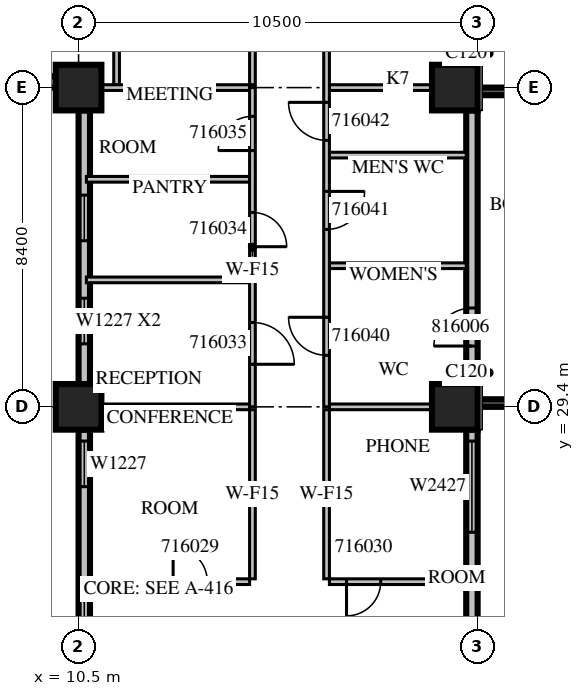
"""IFC4 building model, lengths in metres.
Left out: names, types, materials, properties, quantities, classifications, styles, units other than length and angle.
Written with IfcOpenShell. Run it as: python <this file> out.ifc"""

import sys

from ifc_helpers import new_model, si_unit, direction, frame, frame_2d, origin, origin_2d, place, context, subcontext, project, spatial, rectangle, extrude, source, transform, mapped, element, fill, save


model = new_model("IFC4")
c1 = context("Model", 3, precision=1e-05, world=origin(), true_north=direction((0.0, 1.0)))
c2 = subcontext(c1, "Body", "Model", "MODEL_VIEW")
j1 = project(units=[si_unit("LENGTHUNIT", "METRE"), si_unit("PLANEANGLEUNIT", "RADIAN")], contexts=[c1])
p1 = place(None, origin())
s1 = spatial("IfcSite", under=j1, at=p1, CompositionType="ELEMENT")
p2 = place(p1, origin())
s2 = spatial("IfcBuilding", under=s1, at=p2, CompositionType="ELEMENT")
p3 = place(p2, frame((0.0, 0.0, 78.3)))
s3 = spatial("IfcBuildingStorey", under=s2, at=p3, CompositionType="ELEMENT", Elevation=78.3)
m1 = source(origin(), c2, "Body", "SweptSolid", [
    extrude(rectangle(XDim=1.2, YDim=1.2, at=origin_2d()), origin(), (0.0, 0.0, 1.0), 4.2),
])
for number, where, z_axis, x_axis in (
    (1, (10.5, 29.4, 0.0), (0.0, 0.0, 1.0), (1.0, 0.0, 0.0)),
    (2, (20.4, 29.4, 0.0), (0.0, 0.0, 1.0), (1.0, 0.0, 0.0)),
    (3, (10.5, 37.8, 0.0), (0.0, 0.0, 1.0), (1.0, 0.0, 0.0)),
    (4, (20.4, 37.8, 0.0), (0.0, 0.0, 1.0), (1.0, 0.0, 0.0)),
):
    element("IfcColumn", number, at=place(p3, frame(where, z_axis=z_axis, x_axis=x_axis)), inside=s3, PredefinedType="COLUMN", context=c2, shape_type="MappedRepresentation", body=[
        mapped(m1, transform((0.0, 0.0, 0.0), scale=1.0)),
    ])
m2 = source(origin(), c2, "Body", "SweptSolid", [
    extrude(rectangle(XDim=6.6, YDim=0.3, at=frame_2d((3.3, 0.0))), origin(), (0.0, 0.0, 1.0), 3.8),
])
p4 = place(p3, frame((20.85, 22.2, 0.0), z_axis=(0.0, 0.0, 1.0), x_axis=(0.0, 1.0, 0.0)))
e5 = element("IfcWall", 5, at=p4, inside=s3, PredefinedType="STANDARD", context=c2, shape_type="MappedRepresentation", body=[
    mapped(m2, transform((0.0, 0.0, 0.0), scale=1.0)),
])
m3 = source(origin(), c2, "Body", "SweptSolid", [
    extrude(rectangle(XDim=1.2, YDim=2.7, at=frame_2d((0.6, 1.35))), frame((0.0, 0.16, 0.0), z_axis=(0.0, -1.0, 0.0), x_axis=(1.0, 0.0, 0.0)), (0.0, 0.0, 1.0), 0.32),
])
p5 = place(p4, frame((0.3, 0.0, 0.6)))
e6 = element("IfcOpeningElement", 6, at=p5, cuts=e5, PredefinedType="OPENING", context=c2, shape_type="MappedRepresentation", body=[
    mapped(m3, transform((0.0, 0.0, 0.0), scale=1.0)),
])
m4 = source(origin(), c2, "Body", "SweptSolid", [
    extrude(rectangle(XDim=2.4, YDim=2.7, at=frame_2d((1.2, 1.35))), frame((0.0, 0.16, 0.0), z_axis=(0.0, -1.0, 0.0), x_axis=(1.0, 0.0, 0.0)), (0.0, 0.0, 1.0), 0.32),
])
p6 = place(p4, frame((3.9, 0.0, 0.6)))
e7 = element("IfcOpeningElement", 7, at=p6, cuts=e5, PredefinedType="OPENING", context=c2, shape_type="MappedRepresentation", body=[
    mapped(m4, transform((0.0, 0.0, 0.0), scale=1.0)),
])
m5 = source(origin(), c2, "Body", "SweptSolid", [
    extrude(rectangle(XDim=7.2, YDim=0.3, at=frame_2d((3.6, 0.0))), origin(), (0.0, 0.0, 1.0), 3.8),
])
p7 = place(p3, frame((20.85, 30.0, 0.0), z_axis=(0.0, 0.0, 1.0), x_axis=(0.0, 1.0, 0.0)))
e8 = element("IfcWall", 8, at=p7, inside=s3, PredefinedType="STANDARD", context=c2, shape_type="MappedRepresentation", body=[
    mapped(m5, transform((0.0, 0.0, 0.0), scale=1.0)),
])
m6 = source(origin(), c2, "Body", "SweptSolid", [
    extrude(rectangle(XDim=1.0, YDim=2.1, at=frame_2d((0.5, 1.05))), frame((0.0, 0.16, 0.0), z_axis=(0.0, -1.0, 0.0), x_axis=(1.0, 0.0, 0.0)), (0.0, 0.0, 1.0), 0.32),
])
p8 = place(p7, frame((1.0, 0.0, 0.0)))
e9 = element("IfcOpeningElement", 9, at=p8, cuts=e8, PredefinedType="OPENING", context=c2, shape_type="MappedRepresentation", body=[
    mapped(m6, transform((0.0, 0.0, 0.0), scale=1.0)),
])
p9 = place(p3, frame((20.85, 38.4, 0.0), z_axis=(0.0, 0.0, 1.0), x_axis=(0.0, 1.0, 0.0)))
e10 = element("IfcWall", 10, at=p9, inside=s3, PredefinedType="STANDARD", context=c2, shape_type="MappedRepresentation", body=[
    mapped(m5, transform((0.0, 0.0, 0.0), scale=1.0)),
])
p10 = place(p9, frame((0.3, 0.0, 0.6)))
e11 = element("IfcOpeningElement", 11, at=p10, cuts=e10, PredefinedType="OPENING", context=c2, shape_type="MappedRepresentation", body=[
    mapped(m4, transform((0.0, 0.0, 0.0), scale=1.0)),
])
p11 = place(p9, frame((4.5, 0.0, 0.6)))
e12 = element("IfcOpeningElement", 12, at=p11, cuts=e10, PredefinedType="OPENING", context=c2, shape_type="MappedRepresentation", body=[
    mapped(m4, transform((0.0, 0.0, 0.0), scale=1.0)),
])
m7 = source(origin(), c2, "Body", "SweptSolid", [
    extrude(rectangle(XDim=8.7, YDim=0.3, at=frame_2d((4.35, 0.0))), origin(), (0.0, 0.0, 1.0), 3.8),
])
p12 = place(p3, frame((1.2, 37.95, 0.0), z_axis=(0.0, 0.0, 1.0), x_axis=(1.0, 0.0, 0.0)))
e13 = element("IfcWall", 13, at=p12, inside=s3, PredefinedType="STANDARD", context=c2, shape_type="MappedRepresentation", body=[
    mapped(m7, transform((0.0, 0.0, 0.0), scale=1.0)),
])
p13 = place(p12, frame((0.225, 0.0, 0.6)))
e14 = element("IfcOpeningElement", 14, at=p13, cuts=e13, PredefinedType="OPENING", context=c2, shape_type="MappedRepresentation", body=[
    mapped(m4, transform((0.0, 0.0, 0.0), scale=1.0)),
])
m8 = source(origin(), c2, "Body", "SweptSolid", [
    extrude(rectangle(XDim=1.8, YDim=2.7, at=frame_2d((0.9, 1.35))), frame((0.0, 0.16, 0.0), z_axis=(0.0, -1.0, 0.0), x_axis=(1.0, 0.0, 0.0)), (0.0, 0.0, 1.0), 0.32),
])
p14 = place(p12, frame((5.088, 0.0, 0.6)))
e15 = element("IfcOpeningElement", 15, at=p14, cuts=e13, PredefinedType="OPENING", context=c2, shape_type="MappedRepresentation", body=[
    mapped(m8, transform((0.0, 0.0, 0.0), scale=1.0)),
])
p15 = place(p3, frame((10.65, 37.2, 0.0), z_axis=(0.0, 0.0, 1.0), x_axis=(0.0, -1.0, 0.0)))
e16 = element("IfcWall", 16, at=p15, inside=s3, PredefinedType="STANDARD", context=c2, shape_type="MappedRepresentation", body=[
    mapped(m5, transform((0.0, 0.0, 0.0), scale=1.0)),
])
p16 = place(p15, frame((4.942, 0.0, 0.6)))
e17 = element("IfcOpeningElement", 17, at=p16, cuts=e16, PredefinedType="OPENING", context=c2, shape_type="MappedRepresentation", body=[
    mapped(m3, transform((0.0, 0.0, 0.0), scale=1.0)),
])
p17 = place(p15, frame((2.229, 0.0, 0.6)))
e18 = element("IfcOpeningElement", 18, at=p17, cuts=e16, PredefinedType="OPENING", context=c2, shape_type="MappedRepresentation", body=[
    mapped(m3, transform((0.0, 0.0, 0.0), scale=1.0)),
])
p18 = place(p3, frame((10.65, 28.8, 0.0), z_axis=(0.0, 0.0, 1.0), x_axis=(0.0, -1.0, 0.0)))
e19 = element("IfcWall", 19, at=p18, inside=s3, PredefinedType="STANDARD", context=c2, shape_type="MappedRepresentation", body=[
    mapped(m2, transform((0.0, 0.0, 0.0), scale=1.0)),
])
p19 = place(p18, frame((0.3, 0.0, 0.6)))
e20 = element("IfcOpeningElement", 20, at=p19, cuts=e19, PredefinedType="OPENING", context=c2, shape_type="MappedRepresentation", body=[
    mapped(m3, transform((0.0, 0.0, 0.0), scale=1.0)),
])
p20 = place(p18, frame((4.338, 0.0, 0.6)))
e21 = element("IfcOpeningElement", 21, at=p20, cuts=e19, PredefinedType="OPENING", context=c2, shape_type="MappedRepresentation", body=[
    mapped(m8, transform((0.0, 0.0, 0.0), scale=1.0)),
])
m9 = source(origin(), c2, "Body", "SweptSolid", [
    extrude(rectangle(XDim=3.9, YDim=0.2, at=frame_2d((1.95, 0.0))), origin(), (0.0, 0.0, 1.0), 3.79),
])
p21 = place(p3, frame((21.0, 29.5, 0.0), z_axis=(0.0, 0.0, 1.0), x_axis=(1.0, 0.0, 0.0)))
e22 = element("IfcWall", 22, at=p21, inside=s3, PredefinedType="SOLIDWALL", context=c2, shape_type="MappedRepresentation", body=[
    mapped(m9, transform((0.0, 0.0, 0.0), scale=1.0)),
])
m10 = source(origin(), c2, "Body", "SweptSolid", [
    extrude(rectangle(XDim=2.4, YDim=2.7, at=frame_2d((1.2, 1.35))), frame((0.0, 0.11, 0.0), z_axis=(0.0, -1.0, 0.0), x_axis=(1.0, 0.0, 0.0)), (0.0, 0.0, 1.0), 0.22),
])
p22 = place(p21, frame((0.75, 0.0, 0.6)))
e23 = element("IfcOpeningElement", 23, at=p22, cuts=e22, PredefinedType="OPENING", context=c2, shape_type="MappedRepresentation", body=[
    mapped(m10, transform((0.0, 0.0, 0.0), scale=1.0)),
])
p23 = place(p3, frame((21.0, 37.7, 0.0), z_axis=(0.0, 0.0, 1.0), x_axis=(1.0, 0.0, 0.0)))
e24 = element("IfcWall", 24, at=p23, inside=s3, PredefinedType="SOLIDWALL", context=c2, shape_type="MappedRepresentation", body=[
    mapped(m9, transform((0.0, 0.0, 0.0), scale=1.0)),
])
p24 = place(p23, frame((0.75, 0.0, 0.6)))
e25 = element("IfcOpeningElement", 25, at=p24, cuts=e24, PredefinedType="OPENING", context=c2, shape_type="MappedRepresentation", body=[
    mapped(m10, transform((0.0, 0.0, 0.0), scale=1.0)),
])
m11 = source(origin(), c2, "Body", "SweptSolid", [
    extrude(rectangle(XDim=4.295, YDim=0.15, at=frame_2d((2.147, 0.0))), origin(), (0.0, 0.0, 1.0), 3.8),
])
p25 = place(p3, frame((10.705, 24.8, 0.0), z_axis=(0.0, 0.0, 1.0), x_axis=(1.0, 0.0, 0.0)))
e26 = element("IfcWall", 26, at=p25, inside=s3, PredefinedType="PARTITIONING", context=c2, shape_type="MappedRepresentation", body=[
    mapped(m11, transform((0.0, 0.0, 0.0), scale=1.0)),
])
m12 = source(origin(), c2, "Body", "SweptSolid", [
    extrude(rectangle(XDim=0.9, YDim=2.1, at=frame_2d((0.45, 1.05))), frame((0.0, 0.085, 0.0), z_axis=(0.0, -1.0, 0.0), x_axis=(1.0, 0.0, 0.0)), (0.0, 0.0, 1.0), 0.17),
])
p26 = place(p25, frame((2.283, 0.0, 0.0)))
e27 = element("IfcOpeningElement", 27, at=p26, cuts=e26, PredefinedType="OPENING", context=c2, shape_type="MappedRepresentation", body=[
    mapped(m12, transform((0.0, 0.0, 0.0), scale=1.0)),
])
m13 = source(origin(), c2, "Body", "SweptSolid", [
    extrude(rectangle(XDim=3.6, YDim=0.15, at=frame_2d((1.8, 0.0))), origin(), (0.0, 0.0, 1.0), 3.8),
])
p27 = place(p3, frame((17.1, 24.8, 0.0), z_axis=(0.0, 0.0, 1.0), x_axis=(1.0, 0.0, 0.0)))
e28 = element("IfcWall", 28, at=p27, inside=s3, PredefinedType="PARTITIONING", context=c2, shape_type="MappedRepresentation", body=[
    mapped(m13, transform((0.0, 0.0, 0.0), scale=1.0)),
])
p28 = place(p27, frame((0.45, 0.0, 0.0)))
e29 = element("IfcOpeningElement", 29, at=p28, cuts=e28, PredefinedType="OPENING", context=c2, shape_type="MappedRepresentation", body=[
    mapped(m12, transform((0.0, 0.0, 0.0), scale=1.0)),
])
m14 = source(origin(), c2, "Body", "SweptSolid", [
    extrude(rectangle(XDim=4.45, YDim=0.15, at=frame_2d((2.225, 0.0))), origin(), (0.0, 0.0, 1.0), 3.8),
])
for number, where, z_axis, x_axis in (
    (30, (15.075, 24.875, 0.0), (0.0, 0.0, 1.0), (0.0, 1.0, 0.0)),
    (31, (17.025, 29.325, 0.0), (0.0, 0.0, 1.0), (0.0, -1.0, 0.0)),
):
    element("IfcWall", number, at=place(p3, frame(where, z_axis=z_axis, x_axis=x_axis)), inside=s3, PredefinedType="PARTITIONING", context=c2, shape_type="MappedRepresentation", body=[
        mapped(m14, transform((0.0, 0.0, 0.0), scale=1.0)),
    ])
m15 = source(origin(), c2, "Body", "SweptSolid", [
    extrude(rectangle(XDim=3.901, YDim=0.15, at=frame_2d((1.95, 0.0))), origin(), (0.0, 0.0, 1.0), 3.8),
])
p29 = place(p3, frame((15.0, 29.4, 0.0), z_axis=(0.0, 0.0, 1.0), x_axis=(-1.0, 0.0, 0.0)))
e32 = element("IfcWall", 32, at=p29, inside=s3, PredefinedType="PARTITIONING", context=c2, shape_type="MappedRepresentation", body=[
    mapped(m15, transform((0.0, 0.0, 0.0), scale=1.0)),
])
m16 = source(origin(), c2, "Body", "SweptSolid", [
    extrude(rectangle(XDim=2.701, YDim=0.15, at=frame_2d((1.351, 0.0))), origin(), (0.0, 0.0, 1.0), 3.8),
])
p30 = place(p3, frame((19.801, 29.4, 0.0), z_axis=(0.0, 0.0, 1.0), x_axis=(-1.0, 0.0, 0.0)))
e33 = element("IfcWall", 33, at=p30, inside=s3, PredefinedType="PARTITIONING", context=c2, shape_type="MappedRepresentation", body=[
    mapped(m16, transform((0.0, 0.0, 0.0), scale=1.0)),
])
m17 = source(origin(), c2, "Body", "SweptSolid", [
    extrude(rectangle(XDim=6.45, YDim=0.15, at=frame_2d((3.225, 0.0))), origin(), (0.0, 0.0, 1.0), 3.8),
])
p31 = place(p3, frame((11.5, 44.325, 0.0), z_axis=(0.0, 0.0, 1.0), x_axis=(0.0, -1.0, 0.0)))
e34 = element("IfcWall", 34, at=p31, inside=s3, PredefinedType="PARTITIONING", context=c2, shape_type="MappedRepresentation", body=[
    mapped(m17, transform((0.0, 0.0, 0.0), scale=1.0)),
])
p32 = place(p3, frame((15.075, 37.875, 0.0), z_axis=(0.0, 0.0, 1.0), x_axis=(0.0, 1.0, 0.0)))
e35 = element("IfcWall", 35, at=p32, inside=s3, PredefinedType="PARTITIONING", context=c2, shape_type="MappedRepresentation", body=[
    mapped(m17, transform((0.0, 0.0, 0.0), scale=1.0)),
])
p33 = place(p32, frame((2.737, 0.0, 0.0)))
e36 = element("IfcOpeningElement", 36, at=p33, cuts=e35, PredefinedType="OPENING", context=c2, shape_type="MappedRepresentation", body=[
    mapped(m12, transform((0.0, 0.0, 0.0), scale=1.0)),
])
for number, where, z_axis, x_axis in (
    (37, (15.0, 32.74, 0.0), (0.0, 0.0, 1.0), (-1.0, 0.0, 0.0)),
    (38, (15.0, 35.388, 0.0), (0.0, 0.0, 1.0), (-1.0, 0.0, 0.0)),
):
    element("IfcWall", number, at=place(p3, frame(where, z_axis=z_axis, x_axis=x_axis)), inside=s3, PredefinedType="PARTITIONING", context=c2, shape_type="MappedRepresentation", body=[
        mapped(m11, transform((0.0, 0.0, 0.0), scale=1.0)),
    ])
p34 = place(p3, frame((15.0, 37.8, 0.0), z_axis=(0.0, 0.0, 1.0), x_axis=(-1.0, 0.0, 0.0)))
e39 = element("IfcWall", 39, at=p34, inside=s3, PredefinedType="PARTITIONING", context=c2, shape_type="MappedRepresentation", body=[
    mapped(m15, transform((0.0, 0.0, 0.0), scale=1.0)),
])
for number, where, z_axis, x_axis in (
    (40, (17.1, 33.113, 0.0), (0.0, 0.0, 1.0), (1.0, 0.0, 0.0)),
    (41, (17.1, 36.024, 0.0), (0.0, 0.0, 1.0), (1.0, 0.0, 0.0)),
):
    element("IfcWall", number, at=place(p3, frame(where, z_axis=z_axis, x_axis=x_axis)), inside=s3, PredefinedType="PARTITIONING", context=c2, shape_type="MappedRepresentation", body=[
        mapped(m13, transform((0.0, 0.0, 0.0), scale=1.0)),
    ])
p35 = place(p3, frame((19.801, 37.8, 0.0), z_axis=(0.0, 0.0, 1.0), x_axis=(-1.0, 0.0, 0.0)))
e42 = element("IfcWall", 42, at=p35, inside=s3, PredefinedType="PARTITIONING", context=c2, shape_type="MappedRepresentation", body=[
    mapped(m16, transform((0.0, 0.0, 0.0), scale=1.0)),
])
m18 = source(origin(), c2, "Body", "SweptSolid", [
    extrude(rectangle(XDim=8.4, YDim=0.15, at=frame_2d((4.2, 0.0))), origin(), (0.0, 0.0, 1.0), 3.8),
])
p36 = place(p3, frame((15.075, 29.4, 0.0), z_axis=(0.0, 0.0, 1.0), x_axis=(0.0, 1.0, 0.0)))
e43 = element("IfcWall", 43, at=p36, inside=s3, PredefinedType="PARTITIONING", context=c2, shape_type="MappedRepresentation", body=[
    mapped(m18, transform((0.0, 0.0, 0.0), scale=1.0)),
])
m19 = source(origin(), c2, "Body", "SweptSolid", [
    extrude(rectangle(XDim=1.1, YDim=2.1, at=frame_2d((0.55, 1.05))), frame((0.0, 0.085, 0.0), z_axis=(0.0, -1.0, 0.0), x_axis=(1.0, 0.0, 0.0)), (0.0, 0.0, 1.0), 0.17),
])
p37 = place(p36, frame((1.12, 0.0, 0.0)))
e44 = element("IfcOpeningElement", 44, at=p37, cuts=e43, PredefinedType="OPENING", context=c2, shape_type="MappedRepresentation", body=[
    mapped(m19, transform((0.0, 0.0, 0.0), scale=1.0)),
])
p38 = place(p36, frame((4.214, 0.0, 0.0)))
e45 = element("IfcOpeningElement", 45, at=p38, cuts=e43, PredefinedType="OPENING", context=c2, shape_type="MappedRepresentation", body=[
    mapped(m12, transform((0.0, 0.0, 0.0), scale=1.0)),
])
p39 = place(p36, frame((6.744, 0.0, 0.0)))
e46 = element("IfcOpeningElement", 46, at=p39, cuts=e43, PredefinedType="OPENING", context=c2, shape_type="MappedRepresentation", body=[
    mapped(m12, transform((0.0, 0.0, 0.0), scale=1.0)),
])
p40 = place(p3, frame((17.025, 56.82, 0.0), z_axis=(0.0, 0.0, 1.0), x_axis=(0.0, -1.0, 0.0)))
e47 = element("IfcWall", 47, at=p40, inside=s3, PredefinedType="PARTITIONING", context=c2, shape_type="SweptSolid", body=[
    extrude(rectangle(XDim=27.42, YDim=0.15, at=frame_2d((13.71, 0.0))), origin(), (0.0, 0.0, 1.0), 3.8),
])
m20 = source(origin(), c2, "Body", "SweptSolid", [
    extrude(rectangle(XDim=1.0, YDim=2.1, at=frame_2d((0.5, 1.05))), frame((0.0, 0.085, 0.0), z_axis=(0.0, -1.0, 0.0), x_axis=(1.0, 0.0, 0.0)), (0.0, 0.0, 1.0), 0.17),
])
p41 = place(p40, frame((25.063, 0.0, 0.0)))
e48 = element("IfcOpeningElement", 48, at=p41, cuts=e47, PredefinedType="OPENING", context=c2, shape_type="MappedRepresentation", body=[
    mapped(m20, transform((0.0, 0.0, 0.0), scale=1.0)),
])
p42 = place(p40, frame((21.751, 0.0, 0.0)))
e49 = element("IfcOpeningElement", 49, at=p42, cuts=e47, PredefinedType="OPENING", context=c2, shape_type="MappedRepresentation", body=[
    mapped(m20, transform((0.0, 0.0, 0.0), scale=1.0)),
])
p43 = place(p40, frame((19.408, 0.0, 0.0)))
e50 = element("IfcOpeningElement", 50, at=p43, cuts=e47, PredefinedType="OPENING", context=c2, shape_type="MappedRepresentation", body=[
    mapped(m20, transform((0.0, 0.0, 0.0), scale=1.0)),
])
p44 = place(p40, frame((16.47, 0.0, 0.0)))
e51 = element("IfcOpeningElement", 51, at=p44, cuts=e47, PredefinedType="OPENING", context=c2, shape_type="MappedRepresentation", body=[
    mapped(m12, transform((0.0, 0.0, 0.0), scale=1.0)),
])
p45 = place(p40, frame((12.27, 0.0, 0.0)))
e52 = element("IfcOpeningElement", 52, at=p45, cuts=e47, PredefinedType="OPENING", context=c2, shape_type="MappedRepresentation", body=[
    mapped(m12, transform((0.0, 0.0, 0.0), scale=1.0)),
])
p46 = place(p40, frame((7.496, 0.0, 0.0)))
e53 = element("IfcOpeningElement", 53, at=p46, cuts=e47, PredefinedType="OPENING", context=c2, shape_type="MappedRepresentation", body=[
    mapped(m12, transform((0.0, 0.0, 0.0), scale=1.0)),
])
p47 = place(p40, frame((2.149, 0.0, 0.0)))
e54 = element("IfcOpeningElement", 54, at=p47, cuts=e47, PredefinedType="OPENING", context=c2, shape_type="MappedRepresentation", body=[
    mapped(m12, transform((0.0, 0.0, 0.0), scale=1.0)),
])
m21 = source(origin(), c2, "Body", "SweptSolid", [
    extrude(rectangle(XDim=2.4, YDim=2.7, at=frame_2d((1.2, 1.35))), frame((0.0, 0.03, 0.0), z_axis=(0.0, -1.0, 0.0), x_axis=(1.0, 0.0, 0.0)), (0.0, 0.0, 1.0), 0.06),
])
p48 = place(p6, origin())
e55 = element("IfcWindow", 55, at=p48, inside=s3, PartitioningType="SINGLE_PANEL", PredefinedType="WINDOW", context=c2, shape_type="MappedRepresentation", body=[
    mapped(m21, transform((0.0, 0.0, 0.0), scale=1.0)),
])
fill(e7, e55)
p49 = place(p10, origin())
e56 = element("IfcWindow", 56, at=p49, inside=s3, PartitioningType="SINGLE_PANEL", PredefinedType="WINDOW", context=c2, shape_type="MappedRepresentation", body=[
    mapped(m21, transform((0.0, 0.0, 0.0), scale=1.0)),
])
fill(e11, e56)
m22 = source(origin(), c2, "Body", "SweptSolid", [
    extrude(rectangle(XDim=1.2, YDim=2.7, at=frame_2d((0.6, 1.35))), frame((0.0, 0.03, 0.0), z_axis=(0.0, -1.0, 0.0), x_axis=(1.0, 0.0, 0.0)), (0.0, 0.0, 1.0), 0.06),
])
p50 = place(p16, origin())
e57 = element("IfcWindow", 57, at=p50, inside=s3, PartitioningType="SINGLE_PANEL", PredefinedType="WINDOW", context=c2, shape_type="MappedRepresentation", body=[
    mapped(m22, transform((0.0, 0.0, 0.0), scale=1.0)),
])
fill(e17, e57)
p51 = place(p19, origin())
e58 = element("IfcWindow", 58, at=p51, inside=s3, PartitioningType="SINGLE_PANEL", PredefinedType="WINDOW", context=c2, shape_type="MappedRepresentation", body=[
    mapped(m22, transform((0.0, 0.0, 0.0), scale=1.0)),
])
fill(e20, e58)
m23 = source(origin(), c2, "Body", "SweptSolid", [
    extrude(rectangle(XDim=1.8, YDim=2.7, at=frame_2d((0.9, 1.35))), frame((0.0, 0.03, 0.0), z_axis=(0.0, -1.0, 0.0), x_axis=(1.0, 0.0, 0.0)), (0.0, 0.0, 1.0), 0.06),
])
p52 = place(p20, origin())
e59 = element("IfcWindow", 59, at=p52, inside=s3, PartitioningType="SINGLE_PANEL", PredefinedType="WINDOW", context=c2, shape_type="MappedRepresentation", body=[
    mapped(m23, transform((0.0, 0.0, 0.0), scale=1.0)),
])
fill(e21, e59)
p53 = place(p17, origin())
e60 = element("IfcWindow", 60, at=p53, inside=s3, PartitioningType="SINGLE_PANEL", PredefinedType="WINDOW", context=c2, shape_type="MappedRepresentation", body=[
    mapped(m22, transform((0.0, 0.0, 0.0), scale=1.0)),
])
fill(e18, e60)
m24 = source(origin(), c2, "Body", "SweptSolid", [
    extrude(rectangle(XDim=0.9, YDim=2.1, at=frame_2d((0.45, 1.05))), frame((0.0, 0.025, 0.0), z_axis=(0.0, -1.0, 0.0), x_axis=(1.0, 0.0, 0.0)), (0.0, 0.0, 1.0), 0.05),
])
p54 = place(p26, origin())
e61 = element("IfcDoor", 61, at=p54, inside=s3, OperationType="SINGLE_SWING_LEFT", PredefinedType="DOOR", context=c2, shape_type="MappedRepresentation", body=[
    mapped(m24, transform((0.0, 0.0, 0.0), scale=1.0)),
])
fill(e27, e61)
p55 = place(p28, origin())
e62 = element("IfcDoor", 62, at=p55, inside=s3, OperationType="SINGLE_SWING_RIGHT", PredefinedType="DOOR", context=c2, shape_type="MappedRepresentation", body=[
    mapped(m24, transform((0.0, 0.0, 0.0), scale=1.0)),
])
fill(e29, e62)
m25 = source(origin(), c2, "Body", "SweptSolid", [
    extrude(rectangle(XDim=1.1, YDim=2.1, at=frame_2d((0.55, 1.05))), frame((0.0, 0.025, 0.0), z_axis=(0.0, -1.0, 0.0), x_axis=(1.0, 0.0, 0.0)), (0.0, 0.0, 1.0), 0.05),
])
p56 = place(p37, origin())
e63 = element("IfcDoor", 63, at=p56, inside=s3, OperationType="SINGLE_SWING_RIGHT", PredefinedType="DOOR", context=c2, shape_type="MappedRepresentation", body=[
    mapped(m25, transform((0.0, 0.0, 0.0), scale=1.0)),
])
fill(e44, e63)
p57 = place(p38, origin())
e64 = element("IfcDoor", 64, at=p57, inside=s3, OperationType="SINGLE_SWING_RIGHT", PredefinedType="DOOR", context=c2, shape_type="MappedRepresentation", body=[
    mapped(m24, transform((0.0, 0.0, 0.0), scale=1.0)),
])
fill(e45, e64)
p58 = place(p39, origin())
e65 = element("IfcDoor", 65, at=p58, inside=s3, OperationType="SINGLE_SWING_LEFT", PredefinedType="DOOR", context=c2, shape_type="MappedRepresentation", body=[
    mapped(m24, transform((0.0, 0.0, 0.0), scale=1.0)),
])
fill(e46, e65)
m26 = source(origin(), c2, "Body", "SweptSolid", [
    extrude(rectangle(XDim=1.0, YDim=2.1, at=frame_2d((0.5, 1.05))), frame((0.0, 0.025, 0.0), z_axis=(0.0, -1.0, 0.0), x_axis=(1.0, 0.0, 0.0)), (0.0, 0.0, 1.0), 0.05),
])
p59 = place(p41, origin())
e66 = element("IfcDoor", 66, at=p59, inside=s3, OperationType="SINGLE_SWING_RIGHT", PredefinedType="DOOR", context=c2, shape_type="MappedRepresentation", body=[
    mapped(m26, transform((0.0, 0.0, 0.0), scale=1.0)),
])
fill(e48, e66)
p60 = place(p42, origin())
e67 = element("IfcDoor", 67, at=p60, inside=s3, OperationType="SINGLE_SWING_LEFT", PredefinedType="DOOR", context=c2, shape_type="MappedRepresentation", body=[
    mapped(m26, transform((0.0, 0.0, 0.0), scale=1.0)),
])
fill(e49, e67)
p61 = place(p43, origin())
e68 = element("IfcDoor", 68, at=p61, inside=s3, OperationType="SINGLE_SWING_RIGHT", PredefinedType="DOOR", context=c2, shape_type="MappedRepresentation", body=[
    mapped(m26, transform((0.0, 0.0, 0.0), scale=1.0)),
])
fill(e50, e68)
p62 = place(p8, origin())
e69 = element("IfcDoor", 69, at=p62, inside=s3, OperationType="SINGLE_SWING_LEFT", PredefinedType="DOOR", context=c2, shape_type="MappedRepresentation", body=[
    mapped(m26, transform((0.0, 0.0, 0.0), scale=1.0)),
])
fill(e9, e69)
save(model, sys.argv[1])
